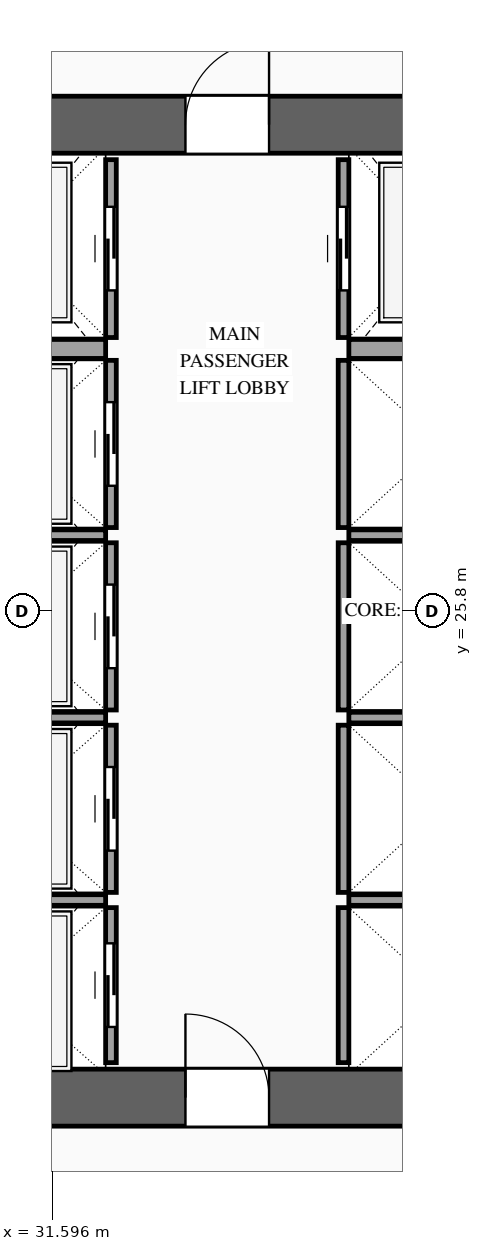
"""IFC4 building model, lengths in metres.
Left out: names, types, materials, properties, quantities, classifications, styles, units other than length and angle.
Written with IfcOpenShell. Run it as: python <this file> out.ifc"""

import sys

from ifc_helpers import new_model, si_unit, direction, frame, frame_2d, origin, place, context, subcontext, project, spatial, rectangle, extrude, source, transform, mapped, element, fill, save


model = new_model("IFC4")
c1 = context("Model", 3, precision=1e-05, world=origin(), true_north=direction((0.0, 1.0)))
c2 = subcontext(c1, "Body", "Model", "MODEL_VIEW")
j1 = project(units=[si_unit("LENGTHUNIT", "METRE"), si_unit("PLANEANGLEUNIT", "RADIAN")], contexts=[c1])
p1 = place(None, origin())
s1 = spatial("IfcSite", under=j1, at=p1, CompositionType="ELEMENT")
p2 = place(p1, origin())
s2 = spatial("IfcBuilding", under=s1, at=p2, CompositionType="ELEMENT")
p3 = place(p2, frame((0.0, 0.0, 115.4)))
s3 = spatial("IfcBuildingStorey", under=s2, at=p3, CompositionType="ELEMENT", Elevation=115.4)
p4 = place(p3, frame((23.425, 19.4, 0.0), z_axis=(0.0, 0.0, 1.0), x_axis=(1.0, 0.0, 0.0)))
e1 = element("IfcWall", 1, at=p4, inside=s3, PredefinedType="SHEAR", context=c2, shape_type="SweptSolid", body=[
    extrude(rectangle(XDim=27.15, YDim=0.75, at=frame_2d((13.575, 0.0))), origin(), (0.0, 0.0, 1.0), 3.6),
])
p5 = place(p4, frame((2.025, 0.0, 0.0)))
e2 = element("IfcOpeningElement", 2, at=p5, cuts=e1, PredefinedType="OPENING", context=c2, shape_type="SweptSolid", body=[
    extrude(rectangle(XDim=1.1, YDim=2.2, at=frame_2d((0.55, 1.1))), frame((0.0, 0.39, 0.0), z_axis=(0.0, -1.0, 0.0), x_axis=(1.0, 0.0, 0.0)), (0.0, 0.0, 1.0), 0.78),
])
p6 = place(p4, frame((9.925, 0.0, 0.0)))
e3 = element("IfcOpeningElement", 3, at=p6, cuts=e1, PredefinedType="OPENING", context=c2, shape_type="SweptSolid", body=[
    extrude(rectangle(XDim=1.1, YDim=2.2, at=frame_2d((0.55, 1.1))), frame((0.0, 0.39, 0.0), z_axis=(0.0, -1.0, 0.0), x_axis=(1.0, 0.0, 0.0)), (0.0, 0.0, 1.0), 0.78),
])
p7 = place(p4, frame((23.125, 0.0, 0.0)))
e4 = element("IfcOpeningElement", 4, at=p7, cuts=e1, PredefinedType="OPENING", context=c2, shape_type="SweptSolid", body=[
    extrude(rectangle(XDim=1.1, YDim=2.2, at=frame_2d((0.55, 1.1))), frame((0.0, 0.39, 0.0), z_axis=(0.0, -1.0, 0.0), x_axis=(1.0, 0.0, 0.0)), (0.0, 0.0, 1.0), 0.78),
])
p8 = place(p4, frame((19.745, 0.0, 0.0)))
e5 = element("IfcOpeningElement", 5, at=p8, cuts=e1, PredefinedType="OPENING", context=c2, shape_type="SweptSolid", body=[
    extrude(rectangle(XDim=0.9, YDim=2.15, at=frame_2d((0.45, 1.075))), frame((0.0, 0.39, 0.0), z_axis=(0.0, -1.0, 0.0), x_axis=(1.0, 0.0, 0.0)), (0.0, 0.0, 1.0), 0.78),
])
p9 = place(p4, frame((18.305, 0.0, 0.0)))
e6 = element("IfcOpeningElement", 6, at=p9, cuts=e1, PredefinedType="OPENING", context=c2, shape_type="SweptSolid", body=[
    extrude(rectangle(XDim=0.9, YDim=2.15, at=frame_2d((0.45, 1.075))), frame((0.0, 0.39, 0.0), z_axis=(0.0, -1.0, 0.0), x_axis=(1.0, 0.0, 0.0)), (0.0, 0.0, 1.0), 0.78),
])
p10 = place(p3, frame((23.425, 32.2, 0.0), z_axis=(0.0, 0.0, 1.0), x_axis=(1.0, 0.0, 0.0)))
e7 = element("IfcWall", 7, at=p10, inside=s3, PredefinedType="SHEAR", context=c2, shape_type="SweptSolid", body=[
    extrude(rectangle(XDim=27.15, YDim=0.75, at=frame_2d((13.575, 0.0))), origin(), (0.0, 0.0, 1.0), 3.6),
])
p11 = place(p10, frame((4.645, 0.0, 0.0)))
e8 = element("IfcOpeningElement", 8, at=p11, cuts=e7, PredefinedType="OPENING", context=c2, shape_type="SweptSolid", body=[
    extrude(rectangle(XDim=0.9, YDim=2.15, at=frame_2d((0.45, 1.075))), frame((0.0, 0.39, 0.0), z_axis=(0.0, -1.0, 0.0), x_axis=(1.0, 0.0, 0.0)), (0.0, 0.0, 1.0), 0.78),
])
p12 = place(p10, frame((9.925, 0.0, 0.0)))
e9 = element("IfcOpeningElement", 9, at=p12, cuts=e7, PredefinedType="OPENING", context=c2, shape_type="SweptSolid", body=[
    extrude(rectangle(XDim=1.1, YDim=2.2, at=frame_2d((0.55, 1.1))), frame((0.0, 0.39, 0.0), z_axis=(0.0, -1.0, 0.0), x_axis=(1.0, 0.0, 0.0)), (0.0, 0.0, 1.0), 0.78),
])
p13 = place(p10, frame((15.775, 0.0, 0.0)))
e10 = element("IfcOpeningElement", 10, at=p13, cuts=e7, PredefinedType="OPENING", context=c2, shape_type="SweptSolid", body=[
    extrude(rectangle(XDim=1.1, YDim=2.2, at=frame_2d((0.55, 1.1))), frame((0.0, 0.39, 0.0), z_axis=(0.0, -1.0, 0.0), x_axis=(1.0, 0.0, 0.0)), (0.0, 0.0, 1.0), 0.78),
])
p14 = place(p10, frame((18.305, 0.0, 0.0)))
e11 = element("IfcOpeningElement", 11, at=p14, cuts=e7, PredefinedType="OPENING", context=c2, shape_type="SweptSolid", body=[
    extrude(rectangle(XDim=0.9, YDim=2.15, at=frame_2d((0.45, 1.075))), frame((0.0, 0.39, 0.0), z_axis=(0.0, -1.0, 0.0), x_axis=(1.0, 0.0, 0.0)), (0.0, 0.0, 1.0), 0.78),
])
p15 = place(p10, frame((19.745, 0.0, 0.0)))
e12 = element("IfcOpeningElement", 12, at=p15, cuts=e7, PredefinedType="OPENING", context=c2, shape_type="SweptSolid", body=[
    extrude(rectangle(XDim=0.9, YDim=2.15, at=frame_2d((0.45, 1.075))), frame((0.0, 0.39, 0.0), z_axis=(0.0, -1.0, 0.0), x_axis=(1.0, 0.0, 0.0)), (0.0, 0.0, 1.0), 0.78),
])
p16 = place(p3, frame((32.37, 19.86, 0.0), z_axis=(0.0, 0.0, 1.0), x_axis=(0.0, 1.0, 0.0)))
e13 = element("IfcWall", 13, at=p16, inside=s3, PredefinedType="SOLIDWALL", context=c2, shape_type="SweptSolid", body=[
    extrude(rectangle(XDim=2.04, YDim=0.14, at=frame_2d((1.02, 0.0))), origin(), (0.0, 0.0, 1.0), 3.38),
])
p17 = place(p16, frame((0.47, 0.0, 0.0)))
e14 = element("IfcOpeningElement", 14, at=p17, cuts=e13, PredefinedType="OPENING", context=c2, shape_type="SweptSolid", body=[
    extrude(rectangle(XDim=1.1, YDim=2.2, at=frame_2d((0.55, 1.1))), frame((0.0, 0.085, 0.0), z_axis=(0.0, -1.0, 0.0), x_axis=(1.0, 0.0, 0.0)), (0.0, 0.0, 1.0), 0.17),
])
m1 = source(origin(), c2, "Body", "SweptSolid", [
    extrude(rectangle(XDim=2.5, YDim=0.14, at=frame_2d((1.25, 0.0))), origin(), (0.0, 0.0, 1.0), 3.38),
])
p18 = place(p3, frame((29.8, 22.0, 0.0), z_axis=(0.0, 0.0, 1.0), x_axis=(1.0, 0.0, 0.0)))
e15 = element("IfcWall", 15, at=p18, inside=s3, PredefinedType="SOLIDWALL", context=c2, shape_type="MappedRepresentation", body=[
    mapped(m1, transform((0.0, 0.0, 0.0), scale=1.0)),
])
p19 = place(p3, frame((32.37, 22.1, 0.0), z_axis=(0.0, 0.0, 1.0), x_axis=(0.0, 1.0, 0.0)))
e16 = element("IfcWall", 16, at=p19, inside=s3, PredefinedType="SOLIDWALL", context=c2, shape_type="SweptSolid", body=[
    extrude(rectangle(XDim=2.2, YDim=0.14, at=frame_2d((1.1, 0.0))), origin(), (0.0, 0.0, 1.0), 3.38),
])
p20 = place(p19, frame((0.55, 0.0, 0.0)))
e17 = element("IfcOpeningElement", 17, at=p20, cuts=e16, PredefinedType="OPENING", context=c2, shape_type="SweptSolid", body=[
    extrude(rectangle(XDim=1.1, YDim=2.2, at=frame_2d((0.55, 1.1))), frame((0.0, 0.085, 0.0), z_axis=(0.0, -1.0, 0.0), x_axis=(1.0, 0.0, 0.0)), (0.0, 0.0, 1.0), 0.17),
])
p21 = place(p3, frame((29.8, 24.4, 0.0), z_axis=(0.0, 0.0, 1.0), x_axis=(1.0, 0.0, 0.0)))
e18 = element("IfcWall", 18, at=p21, inside=s3, PredefinedType="SOLIDWALL", context=c2, shape_type="MappedRepresentation", body=[
    mapped(m1, transform((0.0, 0.0, 0.0), scale=1.0)),
])
p22 = place(p3, frame((32.37, 24.5, 0.0), z_axis=(0.0, 0.0, 1.0), x_axis=(0.0, 1.0, 0.0)))
e19 = element("IfcWall", 19, at=p22, inside=s3, PredefinedType="SOLIDWALL", context=c2, shape_type="SweptSolid", body=[
    extrude(rectangle(XDim=2.2, YDim=0.14, at=frame_2d((1.1, 0.0))), origin(), (0.0, 0.0, 1.0), 3.38),
])
p23 = place(p22, frame((0.55, 0.0, 0.0)))
e20 = element("IfcOpeningElement", 20, at=p23, cuts=e19, PredefinedType="OPENING", context=c2, shape_type="SweptSolid", body=[
    extrude(rectangle(XDim=1.1, YDim=2.2, at=frame_2d((0.55, 1.1))), frame((0.0, 0.085, 0.0), z_axis=(0.0, -1.0, 0.0), x_axis=(1.0, 0.0, 0.0)), (0.0, 0.0, 1.0), 0.17),
])
p24 = place(p3, frame((29.8, 26.8, 0.0), z_axis=(0.0, 0.0, 1.0), x_axis=(1.0, 0.0, 0.0)))
e21 = element("IfcWall", 21, at=p24, inside=s3, PredefinedType="SOLIDWALL", context=c2, shape_type="MappedRepresentation", body=[
    mapped(m1, transform((0.0, 0.0, 0.0), scale=1.0)),
])
p25 = place(p3, frame((32.37, 26.9, 0.0), z_axis=(0.0, 0.0, 1.0), x_axis=(0.0, 1.0, 0.0)))
e22 = element("IfcWall", 22, at=p25, inside=s3, PredefinedType="SOLIDWALL", context=c2, shape_type="SweptSolid", body=[
    extrude(rectangle(XDim=2.2, YDim=0.14, at=frame_2d((1.1, 0.0))), origin(), (0.0, 0.0, 1.0), 3.38),
])
p26 = place(p25, frame((0.55, 0.0, 0.0)))
e23 = element("IfcOpeningElement", 23, at=p26, cuts=e22, PredefinedType="OPENING", context=c2, shape_type="SweptSolid", body=[
    extrude(rectangle(XDim=1.1, YDim=2.2, at=frame_2d((0.55, 1.1))), frame((0.0, 0.085, 0.0), z_axis=(0.0, -1.0, 0.0), x_axis=(1.0, 0.0, 0.0)), (0.0, 0.0, 1.0), 0.17),
])
p27 = place(p3, frame((32.37, 29.4, 0.0), z_axis=(0.0, 0.0, 1.0), x_axis=(0.0, 1.0, 0.0)))
e24 = element("IfcWall", 24, at=p27, inside=s3, PredefinedType="SOLIDWALL", context=c2, shape_type="SweptSolid", body=[
    extrude(rectangle(XDim=2.34, YDim=0.14, at=frame_2d((1.17, 0.0))), origin(), (0.0, 0.0, 1.0), 3.38),
])
p28 = place(p27, frame((0.62, 0.0, 0.0)))
e25 = element("IfcOpeningElement", 25, at=p28, cuts=e24, PredefinedType="OPENING", context=c2, shape_type="SweptSolid", body=[
    extrude(rectangle(XDim=1.1, YDim=2.2, at=frame_2d((0.55, 1.1))), frame((0.0, 0.085, 0.0), z_axis=(0.0, -1.0, 0.0), x_axis=(1.0, 0.0, 0.0)), (0.0, 0.0, 1.0), 0.17),
])
m2 = source(origin(), c2, "Body", "SweptSolid", [
    extrude(rectangle(XDim=2.5, YDim=0.25, at=frame_2d((1.25, 0.0))), origin(), (0.0, 0.0, 1.0), 3.38),
])
p29 = place(p3, frame((29.8, 29.25, 0.0), z_axis=(0.0, 0.0, 1.0), x_axis=(1.0, 0.0, 0.0)))
e26 = element("IfcWall", 26, at=p29, inside=s3, PredefinedType="SOLIDWALL", context=c2, shape_type="MappedRepresentation", body=[
    mapped(m2, transform((0.0, 0.0, 0.0), scale=1.0)),
])
m3 = source(origin(), c2, "Body", "SweptSolid", [
    extrude(rectangle(XDim=2.04, YDim=0.14, at=frame_2d((1.02, 0.0))), origin(), (0.0, 0.0, 1.0), 3.38),
])
p30 = place(p3, frame((35.43, 19.86, 0.0), z_axis=(0.0, 0.0, 1.0), x_axis=(0.0, 1.0, 0.0)))
e27 = element("IfcWall", 27, at=p30, inside=s3, PredefinedType="SOLIDWALL", context=c2, shape_type="MappedRepresentation", body=[
    mapped(m3, transform((0.0, 0.0, 0.0), scale=1.0)),
])
m4 = source(origin(), c2, "Body", "SweptSolid", [
    extrude(rectangle(XDim=2.4, YDim=0.14, at=frame_2d((1.2, 0.0))), origin(), (0.0, 0.0, 1.0), 3.38),
])
p31 = place(p3, frame((35.5, 22.0, 0.0), z_axis=(0.0, 0.0, 1.0), x_axis=(1.0, 0.0, 0.0)))
e28 = element("IfcWall", 28, at=p31, inside=s3, PredefinedType="SOLIDWALL", context=c2, shape_type="MappedRepresentation", body=[
    mapped(m4, transform((0.0, 0.0, 0.0), scale=1.0)),
])
m5 = source(origin(), c2, "Body", "SweptSolid", [
    extrude(rectangle(XDim=2.2, YDim=0.14, at=frame_2d((1.1, 0.0))), origin(), (0.0, 0.0, 1.0), 3.38),
])
p32 = place(p3, frame((35.43, 22.1, 0.0), z_axis=(0.0, 0.0, 1.0), x_axis=(0.0, 1.0, 0.0)))
e29 = element("IfcWall", 29, at=p32, inside=s3, PredefinedType="SOLIDWALL", context=c2, shape_type="MappedRepresentation", body=[
    mapped(m5, transform((0.0, 0.0, 0.0), scale=1.0)),
])
p33 = place(p3, frame((35.5, 24.4, 0.0), z_axis=(0.0, 0.0, 1.0), x_axis=(1.0, 0.0, 0.0)))
e30 = element("IfcWall", 30, at=p33, inside=s3, PredefinedType="SOLIDWALL", context=c2, shape_type="MappedRepresentation", body=[
    mapped(m4, transform((0.0, 0.0, 0.0), scale=1.0)),
])
p34 = place(p3, frame((35.43, 24.5, 0.0), z_axis=(0.0, 0.0, 1.0), x_axis=(0.0, 1.0, 0.0)))
e31 = element("IfcWall", 31, at=p34, inside=s3, PredefinedType="SOLIDWALL", context=c2, shape_type="MappedRepresentation", body=[
    mapped(m5, transform((0.0, 0.0, 0.0), scale=1.0)),
])
p35 = place(p3, frame((35.5, 26.8, 0.0), z_axis=(0.0, 0.0, 1.0), x_axis=(1.0, 0.0, 0.0)))
e32 = element("IfcWall", 32, at=p35, inside=s3, PredefinedType="SOLIDWALL", context=c2, shape_type="MappedRepresentation", body=[
    mapped(m4, transform((0.0, 0.0, 0.0), scale=1.0)),
])
m6 = source(origin(), c2, "Body", "SweptSolid", [
    extrude(rectangle(XDim=2.2, YDim=0.14, at=frame_2d((1.1, 0.0))), origin(), (0.0, 0.0, 1.0), 3.38),
])
p36 = place(p3, frame((35.43, 26.9, 0.0), z_axis=(0.0, 0.0, 1.0), x_axis=(0.0, 1.0, 0.0)))
e33 = element("IfcWall", 33, at=p36, inside=s3, PredefinedType="SOLIDWALL", context=c2, shape_type="MappedRepresentation", body=[
    mapped(m6, transform((0.0, 0.0, 0.0), scale=1.0)),
])
p37 = place(p3, frame((35.43, 29.4, 0.0), z_axis=(0.0, 0.0, 1.0), x_axis=(0.0, 1.0, 0.0)))
e34 = element("IfcWall", 34, at=p37, inside=s3, PredefinedType="SOLIDWALL", context=c2, shape_type="SweptSolid", body=[
    extrude(rectangle(XDim=2.34, YDim=0.14, at=frame_2d((1.17, 0.0))), origin(), (0.0, 0.0, 1.0), 3.38),
])
p38 = place(p37, frame((0.62, 0.0, 0.0)))
e35 = element("IfcOpeningElement", 35, at=p38, cuts=e34, PredefinedType="OPENING", context=c2, shape_type="SweptSolid", body=[
    extrude(rectangle(XDim=1.1, YDim=2.2, at=frame_2d((0.55, 1.1))), frame((0.0, 0.085, 0.0), z_axis=(0.0, -1.0, 0.0), x_axis=(1.0, 0.0, 0.0)), (0.0, 0.0, 1.0), 0.17),
])
m7 = source(origin(), c2, "Body", "SweptSolid", [
    extrude(rectangle(XDim=2.4, YDim=0.25, at=frame_2d((1.2, 0.0))), origin(), (0.0, 0.0, 1.0), 3.38),
])
p39 = place(p3, frame((35.5, 29.25, 0.0), z_axis=(0.0, 0.0, 1.0), x_axis=(1.0, 0.0, 0.0)))
e36 = element("IfcWall", 36, at=p39, inside=s3, PredefinedType="SOLIDWALL", context=c2, shape_type="MappedRepresentation", body=[
    mapped(m7, transform((0.0, 0.0, 0.0), scale=1.0)),
])
m8 = source(origin(), c2, "Body", "SweptSolid", [
    extrude(rectangle(XDim=1.1, YDim=2.2, at=frame_2d((0.55, 1.1))), frame((0.0, 0.025, 0.0), z_axis=(0.0, -1.0, 0.0), x_axis=(1.0, 0.0, 0.0)), (0.0, 0.0, 1.0), 0.05),
])
p40 = place(p17, origin())
e37 = element("IfcDoor", 37, at=p40, inside=s3, OperationType="SLIDING_TO_LEFT", PredefinedType="DOOR", context=c2, shape_type="MappedRepresentation", body=[
    mapped(m8, transform((0.0, 0.0, 0.0), scale=1.0)),
])
fill(e14, e37)
p41 = place(p20, origin())
e38 = element("IfcDoor", 38, at=p41, inside=s3, OperationType="SLIDING_TO_RIGHT", PredefinedType="DOOR", context=c2, shape_type="MappedRepresentation", body=[
    mapped(m8, transform((0.0, 0.0, 0.0), scale=1.0)),
])
fill(e17, e38)
p42 = place(p23, origin())
e39 = element("IfcDoor", 39, at=p42, inside=s3, OperationType="SLIDING_TO_LEFT", PredefinedType="DOOR", context=c2, shape_type="MappedRepresentation", body=[
    mapped(m8, transform((0.0, 0.0, 0.0), scale=1.0)),
])
fill(e20, e39)
p43 = place(p26, origin())
e40 = element("IfcDoor", 40, at=p43, inside=s3, OperationType="SLIDING_TO_RIGHT", PredefinedType="DOOR", context=c2, shape_type="MappedRepresentation", body=[
    mapped(m8, transform((0.0, 0.0, 0.0), scale=1.0)),
])
fill(e23, e40)
p44 = place(p28, origin())
e41 = element("IfcDoor", 41, at=p44, inside=s3, OperationType="SLIDING_TO_LEFT", PredefinedType="DOOR", context=c2, shape_type="MappedRepresentation", body=[
    mapped(m8, transform((0.0, 0.0, 0.0), scale=1.0)),
])
fill(e25, e41)
p45 = place(p38, origin())
e42 = element("IfcDoor", 42, at=p45, inside=s3, OperationType="SLIDING_TO_RIGHT", PredefinedType="DOOR", context=c2, shape_type="MappedRepresentation", body=[
    mapped(m8, transform((0.0, 0.0, 0.0), scale=1.0)),
])
fill(e35, e42)
m9 = source(origin(), c2, "Body", "SweptSolid", [
    extrude(rectangle(XDim=1.1, YDim=2.2, at=frame_2d((0.55, 1.1))), frame((0.0, 0.025, 0.0), z_axis=(0.0, -1.0, 0.0), x_axis=(1.0, 0.0, 0.0)), (0.0, 0.0, 1.0), 0.05),
])
p46 = place(p6, origin())
e43 = element("IfcDoor", 43, at=p46, inside=s3, OperationType="SINGLE_SWING_LEFT", PredefinedType="DOOR", context=c2, shape_type="MappedRepresentation", body=[
    mapped(m9, transform((0.0, 0.0, 0.0), scale=1.0)),
])
fill(e3, e43)
p47 = place(p12, origin())
e44 = element("IfcDoor", 44, at=p47, inside=s3, OperationType="SINGLE_SWING_RIGHT", PredefinedType="DOOR", context=c2, shape_type="MappedRepresentation", body=[
    mapped(m9, transform((0.0, 0.0, 0.0), scale=1.0)),
])
fill(e9, e44)
save(model, sys.argv[1])
